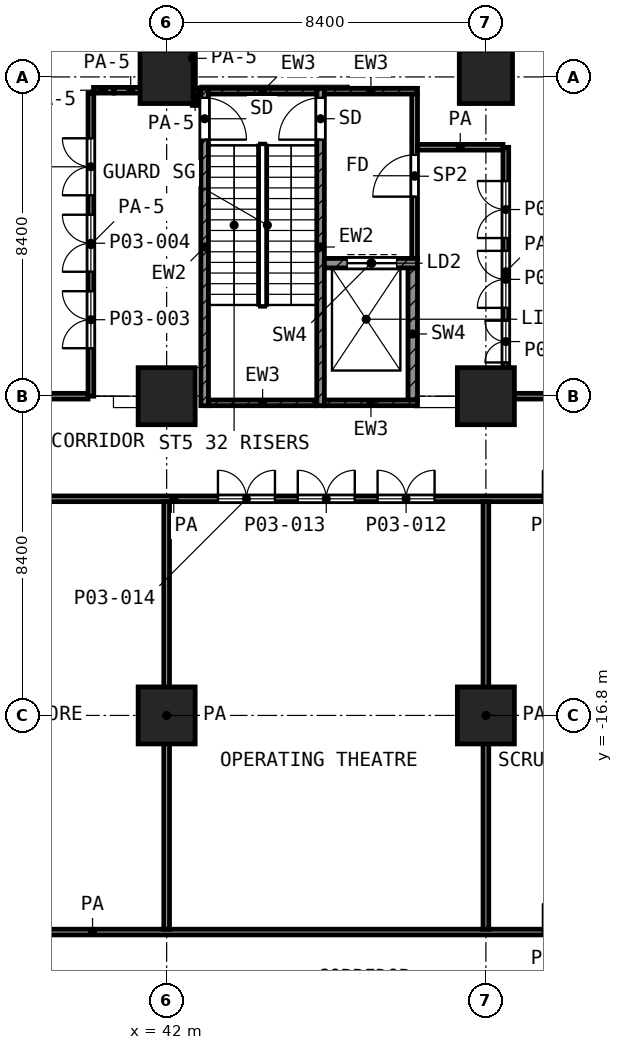
"""IFC4 building model, lengths in metres.
Left out: names, types, materials, properties, quantities, classifications, styles, units other than length and angle.
Written with IfcOpenShell. Run it as: python <this file> out.ifc"""

import sys

from ifc_helpers import new_model, si_unit, direction, frame, frame_2d, origin, origin_2d, place, context, subcontext, project, spatial, rectangle, extrude, element, fill, save


model = new_model("IFC4")
c1 = context("Model", 3, precision=1e-05, world=origin(), true_north=direction((0.0, 1.0)))
c2 = subcontext(c1, "Body", "Model", "MODEL_VIEW")
j1 = project(units=[si_unit("LENGTHUNIT", "METRE"), si_unit("PLANEANGLEUNIT", "RADIAN")], contexts=[c1])
p1 = place(None, origin())
s1 = spatial("IfcSite", under=j1, at=p1, CompositionType="ELEMENT")
p2 = place(p1, origin())
s2 = spatial("IfcBuilding", under=s1, at=p2, CompositionType="ELEMENT")
p3 = place(p2, frame((0.0, 0.0, 12.6)))
s3 = spatial("IfcBuildingStorey", under=s2, at=p3, CompositionType="ELEMENT", Elevation=12.6)
for number, where, z_axis, x_axis in (
    (1, (42.0, 0.0, 0.0), (0.0, 0.0, 1.0), (1.0, 0.0, 0.0)),
    (2, (50.4, 0.0, 0.0), (0.0, 0.0, 1.0), (1.0, 0.0, 0.0)),
):
    element("IfcColumn", number, at=place(p3, frame(where, z_axis=z_axis, x_axis=x_axis)), inside=s3, PredefinedType="COLUMN", context=c2, shape_type="SweptSolid", body=[
        extrude(rectangle(XDim=1.4, YDim=1.4, at=origin_2d()), origin(), (0.0, 0.0, 1.0), 5.6),
    ])
for number, where, z_axis, x_axis in (
    (3, (42.0, -8.4, 0.0), (0.0, 0.0, 1.0), (1.0, 0.0, 0.0)),
    (4, (50.4, -8.4, 0.0), (0.0, 0.0, 1.0), (1.0, 0.0, 0.0)),
    (5, (42.0, -16.8, 0.0), (0.0, 0.0, 1.0), (1.0, 0.0, 0.0)),
    (6, (50.4, -16.8, 0.0), (0.0, 0.0, 1.0), (1.0, 0.0, 0.0)),
):
    element("IfcColumn", number, at=place(p3, frame(where, z_axis=z_axis, x_axis=x_axis)), inside=s3, PredefinedType="COLUMN", context=c2, shape_type="SweptSolid", body=[
        extrude(rectangle(XDim=1.5, YDim=1.5, at=origin_2d()), origin(), (0.0, 0.0, 1.0), 5.6),
    ])
p4 = place(p3, frame((43.0, -8.65, 0.0), z_axis=(0.0, 0.0, 1.0), x_axis=(0.0, 1.0, 0.0)))
e7 = element("IfcWall", 7, at=p4, inside=s3, PredefinedType="SHEAR", context=c2, shape_type="SweptSolid", body=[
    extrude(rectangle(XDim=8.35, YDim=0.2, at=frame_2d((4.175, 0.0))), origin(), (0.0, 0.0, 1.0), 5.25),
])
p5 = place(p4, frame((7.0, 0.0, 0.0)))
e8 = element("IfcOpeningElement", 8, at=p5, cuts=e7, PredefinedType="OPENING", context=c2, shape_type="SweptSolid", body=[
    extrude(rectangle(XDim=1.1, YDim=2.1, at=frame_2d((0.55, 1.05))), frame((0.0, 0.11, 0.0), z_axis=(0.0, -1.0, 0.0), x_axis=(1.0, 0.0, 0.0)), (0.0, 0.0, 1.0), 0.22),
])
p6 = place(p3, frame((46.05, -8.65, 0.0), z_axis=(0.0, 0.0, 1.0), x_axis=(0.0, 1.0, 0.0)))
e9 = element("IfcWall", 9, at=p6, inside=s3, PredefinedType="SHEAR", context=c2, shape_type="SweptSolid", body=[
    extrude(rectangle(XDim=8.35, YDim=0.2, at=frame_2d((4.175, 0.0))), origin(), (0.0, 0.0, 1.0), 5.25),
])
p7 = place(p6, frame((7.0, 0.0, 0.0)))
e10 = element("IfcOpeningElement", 10, at=p7, cuts=e9, PredefinedType="OPENING", context=c2, shape_type="SweptSolid", body=[
    extrude(rectangle(XDim=1.1, YDim=2.1, at=frame_2d((0.55, 1.05))), frame((0.0, 0.11, 0.0), z_axis=(0.0, -1.0, 0.0), x_axis=(1.0, 0.0, 0.0)), (0.0, 0.0, 1.0), 0.22),
])
p8 = place(p3, frame((43.1, -0.375, 0.0), z_axis=(0.0, 0.0, 1.0), x_axis=(1.0, 0.0, 0.0)))
e11 = element("IfcWall", 11, at=p8, inside=s3, PredefinedType="SHEAR", context=c2, shape_type="SweptSolid", body=[
    extrude(rectangle(XDim=2.85, YDim=0.15, at=frame_2d((1.425, 0.0))), origin(), (0.0, 0.0, 1.0), 5.25),
])
p9 = place(p3, frame((46.15, -0.375, 0.0), z_axis=(0.0, 0.0, 1.0), x_axis=(1.0, 0.0, 0.0)))
e12 = element("IfcWall", 12, at=p9, inside=s3, PredefinedType="SHEAR", context=c2, shape_type="SweptSolid", body=[
    extrude(rectangle(XDim=2.45, YDim=0.15, at=frame_2d((1.225, 0.0))), origin(), (0.0, 0.0, 1.0), 5.25),
])
p10 = place(p3, frame((43.1, -8.575, 0.0), z_axis=(0.0, 0.0, 1.0), x_axis=(1.0, 0.0, 0.0)))
e13 = element("IfcWall", 13, at=p10, inside=s3, PredefinedType="SHEAR", context=c2, shape_type="SweptSolid", body=[
    extrude(rectangle(XDim=2.85, YDim=0.15, at=frame_2d((1.425, 0.0))), origin(), (0.0, 0.0, 1.0), 5.25),
])
p11 = place(p3, frame((46.15, -8.575, 0.0), z_axis=(0.0, 0.0, 1.0), x_axis=(1.0, 0.0, 0.0)))
e14 = element("IfcWall", 14, at=p11, inside=s3, PredefinedType="SHEAR", context=c2, shape_type="SweptSolid", body=[
    extrude(rectangle(XDim=2.45, YDim=0.15, at=frame_2d((1.225, 0.0))), origin(), (0.0, 0.0, 1.0), 5.25),
])
p12 = place(p3, frame((46.15, -4.9, 0.0), z_axis=(0.0, 0.0, 1.0), x_axis=(1.0, 0.0, 0.0)))
e15 = element("IfcWall", 15, at=p12, inside=s3, PredefinedType="SHEAR", context=c2, shape_type="SweptSolid", body=[
    extrude(rectangle(XDim=2.45, YDim=0.25, at=frame_2d((1.225, 0.0))), origin(), (0.0, 0.0, 1.0), 5.25),
])
p13 = place(p12, frame((0.6, 0.0, 0.0)))
e16 = element("IfcOpeningElement", 16, at=p13, cuts=e15, PredefinedType="OPENING", context=c2, shape_type="SweptSolid", body=[
    extrude(rectangle(XDim=1.3, YDim=2.1, at=frame_2d((0.65, 1.05))), frame((0.0, 0.135, 0.0), z_axis=(0.0, -1.0, 0.0), x_axis=(1.0, 0.0, 0.0)), (0.0, 0.0, 1.0), 0.27),
])
p14 = place(p3, frame((48.475, -8.5, 0.0), z_axis=(0.0, 0.0, 1.0), x_axis=(0.0, 1.0, 0.0)))
e17 = element("IfcWall", 17, at=p14, inside=s3, PredefinedType="SHEAR", context=c2, shape_type="SweptSolid", body=[
    extrude(rectangle(XDim=3.475, YDim=0.25, at=frame_2d((1.738, 0.0))), origin(), (0.0, 0.0, 1.0), 5.25),
])
p15 = place(p3, frame((48.525, -4.775, 0.0), z_axis=(0.0, 0.0, 1.0), x_axis=(0.0, 1.0, 0.0)))
e18 = element("IfcWall", 18, at=p15, inside=s3, PredefinedType="PARTITIONING", context=c2, shape_type="SweptSolid", body=[
    extrude(rectangle(XDim=4.325, YDim=0.15, at=frame_2d((2.163, 0.0))), origin(), (0.0, 0.0, 1.0), 5.25),
])
p16 = place(p15, frame((1.625, 0.0, 0.0)))
e19 = element("IfcOpeningElement", 19, at=p16, cuts=e18, PredefinedType="OPENING", context=c2, shape_type="SweptSolid", body=[
    extrude(rectangle(XDim=1.1, YDim=2.1, at=frame_2d((0.55, 1.05))), frame((0.0, 0.085, 0.0), z_axis=(0.0, -1.0, 0.0), x_axis=(1.0, 0.0, 0.0)), (0.0, 0.0, 1.0), 0.17),
])
p17 = place(p3, frame((25.2, -22.5, 0.0), z_axis=(0.0, 0.0, 1.0), x_axis=(1.0, 0.0, 0.0)))
e20 = element("IfcWall", 20, at=p17, inside=s3, PredefinedType="PARTITIONING", context=c2, shape_type="SweptSolid", body=[
    extrude(rectangle(XDim=29.7, YDim=0.15, at=frame_2d((14.85, 0.0))), origin(), (0.0, 0.0, 1.0), 5.25),
])
p18 = place(p17, frame((12.1, 0.0, 0.0)))
e21 = element("IfcOpeningElement", 21, at=p18, cuts=e20, PredefinedType="OPENING", context=c2, shape_type="SweptSolid", body=[
    extrude(rectangle(XDim=1.0, YDim=2.1, at=frame_2d((0.5, 1.05))), frame((0.0, 0.085, 0.0), z_axis=(0.0, -1.0, 0.0), x_axis=(1.0, 0.0, 0.0)), (0.0, 0.0, 1.0), 0.17),
])
p19 = place(p17, frame((26.7, 0.0, 0.0)))
e22 = element("IfcOpeningElement", 22, at=p19, cuts=e20, PredefinedType="OPENING", context=c2, shape_type="SweptSolid", body=[
    extrude(rectangle(XDim=1.5, YDim=2.1, at=frame_2d((0.75, 1.05))), frame((0.0, 0.085, 0.0), z_axis=(0.0, -1.0, 0.0), x_axis=(1.0, 0.0, 0.0)), (0.0, 0.0, 1.0), 0.17),
])
p20 = place(p3, frame((29.475, -11.1, 0.0), z_axis=(0.0, 0.0, 1.0), x_axis=(1.0, 0.0, 0.0)))
e23 = element("IfcWall", 23, at=p20, inside=s3, PredefinedType="PARTITIONING", context=c2, shape_type="SweptSolid", body=[
    extrude(rectangle(XDim=25.425, YDim=0.15, at=frame_2d((12.712, 0.0))), origin(), (0.0, 0.0, 1.0), 5.25),
])
p21 = place(p20, frame((18.075, 0.0, 0.0)))
e24 = element("IfcOpeningElement", 24, at=p21, cuts=e23, PredefinedType="OPENING", context=c2, shape_type="SweptSolid", body=[
    extrude(rectangle(XDim=1.5, YDim=2.1, at=frame_2d((0.75, 1.05))), frame((0.0, 0.085, 0.0), z_axis=(0.0, -1.0, 0.0), x_axis=(1.0, 0.0, 0.0)), (0.0, 0.0, 1.0), 0.17),
])
p22 = place(p20, frame((15.975, 0.0, 0.0)))
e25 = element("IfcOpeningElement", 25, at=p22, cuts=e23, PredefinedType="OPENING", context=c2, shape_type="SweptSolid", body=[
    extrude(rectangle(XDim=1.5, YDim=2.1, at=frame_2d((0.75, 1.05))), frame((0.0, 0.085, 0.0), z_axis=(0.0, -1.0, 0.0), x_axis=(1.0, 0.0, 0.0)), (0.0, 0.0, 1.0), 0.17),
])
p23 = place(p20, frame((13.875, 0.0, 0.0)))
e26 = element("IfcOpeningElement", 26, at=p23, cuts=e23, PredefinedType="OPENING", context=c2, shape_type="SweptSolid", body=[
    extrude(rectangle(XDim=1.5, YDim=2.1, at=frame_2d((0.75, 1.05))), frame((0.0, 0.085, 0.0), z_axis=(0.0, -1.0, 0.0), x_axis=(1.0, 0.0, 0.0)), (0.0, 0.0, 1.0), 0.17),
])
p24 = place(p20, frame((22.425, 0.0, 0.0)))
e27 = element("IfcOpeningElement", 27, at=p24, cuts=e23, PredefinedType="OPENING", context=c2, shape_type="SweptSolid", body=[
    extrude(rectangle(XDim=1.5, YDim=2.1, at=frame_2d((0.75, 1.05))), frame((0.0, 0.085, 0.0), z_axis=(0.0, -1.0, 0.0), x_axis=(1.0, 0.0, 0.0)), (0.0, 0.0, 1.0), 0.17),
])
p25 = place(p20, frame((1.525, 0.0, 0.0)))
e28 = element("IfcOpeningElement", 28, at=p25, cuts=e23, PredefinedType="OPENING", context=c2, shape_type="SweptSolid", body=[
    extrude(rectangle(XDim=1.0, YDim=2.1, at=frame_2d((0.5, 1.05))), frame((0.0, 0.085, 0.0), z_axis=(0.0, -1.0, 0.0), x_axis=(1.0, 0.0, 0.0)), (0.0, 0.0, 1.0), 0.17),
])
p26 = place(p3, frame((25.2, -8.4, 0.0), z_axis=(0.0, 0.0, 1.0), x_axis=(1.0, 0.0, 0.0)))
e29 = element("IfcWall", 29, at=p26, inside=s3, PredefinedType="PARTITIONING", context=c2, shape_type="SweptSolid", body=[
    extrude(rectangle(XDim=14.732, YDim=0.15, at=frame_2d((7.366, 0.0))), origin(), (0.0, 0.0, 1.0), 5.25),
])
p27 = place(p26, frame((1.2, 0.0, 0.0)))
e30 = element("IfcOpeningElement", 30, at=p27, cuts=e29, PredefinedType="OPENING", context=c2, shape_type="SweptSolid", body=[
    extrude(rectangle(XDim=1.2, YDim=2.1, at=frame_2d((0.6, 1.05))), frame((0.0, 0.085, 0.0), z_axis=(0.0, -1.0, 0.0), x_axis=(1.0, 0.0, 0.0)), (0.0, 0.0, 1.0), 0.17),
])
p28 = place(p26, frame((6.6, 0.0, 0.0)))
e31 = element("IfcOpeningElement", 31, at=p28, cuts=e29, PredefinedType="OPENING", context=c2, shape_type="SweptSolid", body=[
    extrude(rectangle(XDim=1.0, YDim=2.1, at=frame_2d((0.5, 1.05))), frame((0.0, 0.085, 0.0), z_axis=(0.0, -1.0, 0.0), x_axis=(1.0, 0.0, 0.0)), (0.0, 0.0, 1.0), 0.17),
])
p29 = place(p3, frame((51.0, -8.4, 0.0), z_axis=(0.0, 0.0, 1.0), x_axis=(1.0, 0.0, 0.0)))
e32 = element("IfcWall", 32, at=p29, inside=s3, PredefinedType="PARTITIONING", context=c2, shape_type="SweptSolid", body=[
    extrude(rectangle(XDim=6.6, YDim=0.15, at=frame_2d((3.3, 0.0))), origin(), (0.0, 0.0, 1.0), 5.25),
])
p30 = place(p29, frame((3.5, 0.0, 0.0)))
e33 = element("IfcOpeningElement", 33, at=p30, cuts=e32, PredefinedType="OPENING", context=c2, shape_type="SweptSolid", body=[
    extrude(rectangle(XDim=1.5, YDim=2.1, at=frame_2d((0.75, 1.05))), frame((0.0, 0.085, 0.0), z_axis=(0.0, -1.0, 0.0), x_axis=(1.0, 0.0, 0.0)), (0.0, 0.0, 1.0), 0.17),
])
p31 = place(p29, frame((5.3, 0.0, 0.0)))
e34 = element("IfcOpeningElement", 34, at=p31, cuts=e32, PredefinedType="OPENING", context=c2, shape_type="SweptSolid", body=[
    extrude(rectangle(XDim=1.1, YDim=2.1, at=frame_2d((0.55, 1.05))), frame((0.0, 0.085, 0.0), z_axis=(0.0, -1.0, 0.0), x_axis=(1.0, 0.0, 0.0)), (0.0, 0.0, 1.0), 0.17),
])
p32 = place(p3, frame((48.6, -1.85, 0.0), z_axis=(0.0, 0.0, 1.0), x_axis=(1.0, 0.0, 0.0)))
e35 = element("IfcWall", 35, at=p32, inside=s3, PredefinedType="PARTITIONING", context=c2, shape_type="SweptSolid", body=[
    extrude(rectangle(XDim=2.249, YDim=0.15, at=frame_2d((1.125, 0.0))), origin(), (0.0, 0.0, 1.0), 5.25),
])
p33 = place(p3, frame((40.076, -0.35, 0.0), z_axis=(0.0, 0.0, 1.0), x_axis=(1.0, 0.0, 0.0)))
e36 = element("IfcWall", 36, at=p33, inside=s3, PredefinedType="PARTITIONING", context=c2, shape_type="SweptSolid", body=[
    extrude(rectangle(XDim=0.524, YDim=0.15, at=frame_2d((0.262, 0.0))), origin(), (0.0, 0.0, 1.0), 3.85),
])
p34 = place(p3, frame((40.62, -0.35, 0.0), z_axis=(0.0, 0.0, 1.0), x_axis=(1.0, 0.0, 0.0)))
e37 = element("IfcWall", 37, at=p34, inside=s3, PredefinedType="PARTITIONING", context=c2, shape_type="SweptSolid", body=[
    extrude(rectangle(XDim=0.868, YDim=0.15, at=frame_2d((0.434, 0.0))), origin(), (0.0, 0.0, 1.0), 3.85),
])
p35 = place(p3, frame((40.007, -8.4, 0.0), z_axis=(0.0, 0.0, 1.0), x_axis=(0.0, 1.0, 0.0)))
e38 = element("IfcWall", 38, at=p35, inside=s3, PredefinedType="PARTITIONING", context=c2, shape_type="SweptSolid", body=[
    extrude(rectangle(XDim=7.975, YDim=0.15, at=frame_2d((3.987, 0.0))), origin(), (0.0, 0.0, 1.0), 3.85),
])
p36 = place(p35, frame((1.262, 0.0, 0.0)))
e39 = element("IfcOpeningElement", 39, at=p36, cuts=e38, PredefinedType="OPENING", context=c2, shape_type="SweptSolid", body=[
    extrude(rectangle(XDim=1.5, YDim=2.1, at=frame_2d((0.75, 1.05))), frame((0.0, 0.085, 0.0), z_axis=(0.0, -1.0, 0.0), x_axis=(1.0, 0.0, 0.0)), (0.0, 0.0, 1.0), 0.17),
])
p37 = place(p35, frame((3.274, 0.0, 0.0)))
e40 = element("IfcOpeningElement", 40, at=p37, cuts=e38, PredefinedType="OPENING", context=c2, shape_type="SweptSolid", body=[
    extrude(rectangle(XDim=1.5, YDim=2.1, at=frame_2d((0.75, 1.05))), frame((0.0, 0.085, 0.0), z_axis=(0.0, -1.0, 0.0), x_axis=(1.0, 0.0, 0.0)), (0.0, 0.0, 1.0), 0.17),
])
p38 = place(p35, frame((5.286, 0.0, 0.0)))
e41 = element("IfcOpeningElement", 41, at=p38, cuts=e38, PredefinedType="OPENING", context=c2, shape_type="SweptSolid", body=[
    extrude(rectangle(XDim=1.5, YDim=2.1, at=frame_2d((0.75, 1.05))), frame((0.0, 0.085, 0.0), z_axis=(0.0, -1.0, 0.0), x_axis=(1.0, 0.0, 0.0)), (0.0, 0.0, 1.0), 0.17),
])
p39 = place(p3, frame((42.0, -22.425, 0.0), z_axis=(0.0, 0.0, 1.0), x_axis=(0.0, 1.0, 0.0)))
e42 = element("IfcWall", 42, at=p39, inside=s3, PredefinedType="PARTITIONING", context=c2, shape_type="SweptSolid", body=[
    extrude(rectangle(XDim=11.25, YDim=0.15, at=frame_2d((5.625, 0.0))), origin(), (0.0, 0.0, 1.0), 5.25),
])
p40 = place(p3, frame((42.68, -0.3, 0.0), z_axis=(0.0, 0.0, 1.0), x_axis=(0.0, 1.0, 0.0)))
e43 = element("IfcWall", 43, at=p40, inside=s3, PredefinedType="PARTITIONING", context=c2, shape_type="SweptSolid", body=[
    extrude(rectangle(XDim=1.58, YDim=0.15, at=frame_2d((0.79, 0.0))), origin(), (0.0, 0.0, 1.0), 3.85),
])
p41 = place(p3, frame((42.75, -0.75, 0.0), z_axis=(0.0, 0.0, 1.0), x_axis=(0.0, 1.0, 0.0)))
e44 = element("IfcWall", 44, at=p41, inside=s3, PredefinedType="PARTITIONING", context=c2, shape_type="SweptSolid", body=[
    extrude(rectangle(XDim=0.45, YDim=0.15, at=frame_2d((0.225, 0.0))), origin(), (0.0, 0.0, 1.0), 3.85),
])
p42 = place(p3, frame((50.4, -22.425, 0.0), z_axis=(0.0, 0.0, 1.0), x_axis=(0.0, 1.0, 0.0)))
e45 = element("IfcWall", 45, at=p42, inside=s3, PredefinedType="PARTITIONING", context=c2, shape_type="SweptSolid", body=[
    extrude(rectangle(XDim=11.25, YDim=0.15, at=frame_2d((5.625, 0.0))), origin(), (0.0, 0.0, 1.0), 5.25),
])
p43 = place(p3, frame((50.925, -8.4, 0.0), z_axis=(0.0, 0.0, 1.0), x_axis=(0.0, 1.0, 0.0)))
e46 = element("IfcWall", 46, at=p43, inside=s3, PredefinedType="PARTITIONING", context=c2, shape_type="SweptSolid", body=[
    extrude(rectangle(XDim=6.548, YDim=0.15, at=frame_2d((3.274, 0.0))), origin(), (0.0, 0.0, 1.0), 5.25),
])
p44 = place(p43, frame((4.161, 0.0, 0.0)))
e47 = element("IfcOpeningElement", 47, at=p44, cuts=e46, PredefinedType="OPENING", context=c2, shape_type="SweptSolid", body=[
    extrude(rectangle(XDim=1.5, YDim=2.1, at=frame_2d((0.75, 1.05))), frame((0.0, 0.085, 0.0), z_axis=(0.0, -1.0, 0.0), x_axis=(1.0, 0.0, 0.0)), (0.0, 0.0, 1.0), 0.17),
])
p45 = place(p43, frame((2.324, 0.0, 0.0)))
e48 = element("IfcOpeningElement", 48, at=p45, cuts=e46, PredefinedType="OPENING", context=c2, shape_type="SweptSolid", body=[
    extrude(rectangle(XDim=1.5, YDim=2.1, at=frame_2d((0.75, 1.05))), frame((0.0, 0.085, 0.0), z_axis=(0.0, -1.0, 0.0), x_axis=(1.0, 0.0, 0.0)), (0.0, 0.0, 1.0), 0.17),
])
p46 = place(p43, frame((0.887, 0.0, 0.0)))
e49 = element("IfcOpeningElement", 49, at=p46, cuts=e46, PredefinedType="OPENING", context=c2, shape_type="SweptSolid", body=[
    extrude(rectangle(XDim=1.1, YDim=2.1, at=frame_2d((0.55, 1.05))), frame((0.0, 0.085, 0.0), z_axis=(0.0, -1.0, 0.0), x_axis=(1.0, 0.0, 0.0)), (0.0, 0.0, 1.0), 0.17),
])
p47 = place(p5, frame((1.1, 0.0, 0.0), z_axis=(0.0, 0.0, 1.0), x_axis=(-1.0, 0.0, 0.0)))
e50 = element("IfcDoor", 50, at=p47, inside=s3, OperationType="SINGLE_SWING_LEFT", PredefinedType="DOOR", context=c2, shape_type="SweptSolid", body=[
    extrude(rectangle(XDim=1.1, YDim=2.1, at=frame_2d((0.55, 1.05))), frame((0.0, 0.025, 0.0), z_axis=(0.0, -1.0, 0.0), x_axis=(1.0, 0.0, 0.0)), (0.0, 0.0, 1.0), 0.05),
])
fill(e8, e50)
p48 = place(p7, origin())
e51 = element("IfcDoor", 51, at=p48, inside=s3, OperationType="SINGLE_SWING_LEFT", PredefinedType="DOOR", context=c2, shape_type="SweptSolid", body=[
    extrude(rectangle(XDim=1.1, YDim=2.1, at=frame_2d((0.55, 1.05))), frame((0.0, 0.025, 0.0), z_axis=(0.0, -1.0, 0.0), x_axis=(1.0, 0.0, 0.0)), (0.0, 0.0, 1.0), 0.05),
])
fill(e10, e51)
p49 = place(p13, origin())
e52 = element("IfcDoor", 52, at=p49, inside=s3, OperationType="DOUBLE_DOOR_SLIDING", PredefinedType="DOOR", context=c2, shape_type="SweptSolid", body=[
    extrude(rectangle(XDim=1.3, YDim=2.1, at=frame_2d((0.65, 1.05))), frame((0.0, 0.025, 0.0), z_axis=(0.0, -1.0, 0.0), x_axis=(1.0, 0.0, 0.0)), (0.0, 0.0, 1.0), 0.05),
])
fill(e16, e52)
p50 = place(p16, origin())
e53 = element("IfcDoor", 53, at=p50, inside=s3, OperationType="SINGLE_SWING_LEFT", PredefinedType="DOOR", context=c2, shape_type="SweptSolid", body=[
    extrude(rectangle(XDim=1.1, YDim=2.1, at=frame_2d((0.55, 1.05))), frame((0.0, 0.025, 0.0), z_axis=(0.0, -1.0, 0.0), x_axis=(1.0, 0.0, 0.0)), (0.0, 0.0, 1.0), 0.05),
])
fill(e19, e53)
p51 = place(p36, origin())
e54 = element("IfcDoor", 54, at=p51, inside=s3, OperationType="DOUBLE_DOOR_SINGLE_SWING", PredefinedType="DOOR", context=c2, shape_type="SweptSolid", body=[
    extrude(rectangle(XDim=1.5, YDim=2.1, at=frame_2d((0.75, 1.05))), frame((0.0, 0.025, 0.0), z_axis=(0.0, -1.0, 0.0), x_axis=(1.0, 0.0, 0.0)), (0.0, 0.0, 1.0), 0.05),
])
fill(e39, e54)
p52 = place(p37, origin())
e55 = element("IfcDoor", 55, at=p52, inside=s3, OperationType="DOUBLE_DOOR_SINGLE_SWING", PredefinedType="DOOR", context=c2, shape_type="SweptSolid", body=[
    extrude(rectangle(XDim=1.5, YDim=2.1, at=frame_2d((0.75, 1.05))), frame((0.0, 0.025, 0.0), z_axis=(0.0, -1.0, 0.0), x_axis=(1.0, 0.0, 0.0)), (0.0, 0.0, 1.0), 0.05),
])
fill(e40, e55)
p53 = place(p38, origin())
e56 = element("IfcDoor", 56, at=p53, inside=s3, OperationType="DOUBLE_DOOR_SINGLE_SWING", PredefinedType="DOOR", context=c2, shape_type="SweptSolid", body=[
    extrude(rectangle(XDim=1.5, YDim=2.1, at=frame_2d((0.75, 1.05))), frame((0.0, 0.025, 0.0), z_axis=(0.0, -1.0, 0.0), x_axis=(1.0, 0.0, 0.0)), (0.0, 0.0, 1.0), 0.05),
])
fill(e41, e56)
p54 = place(p44, origin())
e57 = element("IfcDoor", 57, at=p54, inside=s3, OperationType="DOUBLE_DOOR_SINGLE_SWING", PredefinedType="DOOR", context=c2, shape_type="SweptSolid", body=[
    extrude(rectangle(XDim=1.5, YDim=2.1, at=frame_2d((0.75, 1.05))), frame((0.0, 0.025, 0.0), z_axis=(0.0, -1.0, 0.0), x_axis=(1.0, 0.0, 0.0)), (0.0, 0.0, 1.0), 0.05),
])
fill(e47, e57)
p55 = place(p45, origin())
e58 = element("IfcDoor", 58, at=p55, inside=s3, OperationType="DOUBLE_DOOR_SINGLE_SWING", PredefinedType="DOOR", context=c2, shape_type="SweptSolid", body=[
    extrude(rectangle(XDim=1.5, YDim=2.1, at=frame_2d((0.75, 1.05))), frame((0.0, 0.025, 0.0), z_axis=(0.0, -1.0, 0.0), x_axis=(1.0, 0.0, 0.0)), (0.0, 0.0, 1.0), 0.05),
])
fill(e48, e58)
p56 = place(p46, origin())
e59 = element("IfcDoor", 59, at=p56, inside=s3, OperationType="DOUBLE_DOOR_SINGLE_SWING", PredefinedType="DOOR", context=c2, shape_type="SweptSolid", body=[
    extrude(rectangle(XDim=1.1, YDim=2.1, at=frame_2d((0.55, 1.05))), frame((0.0, 0.025, 0.0), z_axis=(0.0, -1.0, 0.0), x_axis=(1.0, 0.0, 0.0)), (0.0, 0.0, 1.0), 0.05),
])
fill(e49, e59)
p57 = place(p21, origin())
e60 = element("IfcDoor", 60, at=p57, inside=s3, OperationType="DOUBLE_DOOR_SINGLE_SWING", PredefinedType="DOOR", context=c2, shape_type="SweptSolid", body=[
    extrude(rectangle(XDim=1.5, YDim=2.1, at=frame_2d((0.75, 1.05))), frame((0.0, 0.025, 0.0), z_axis=(0.0, -1.0, 0.0), x_axis=(1.0, 0.0, 0.0)), (0.0, 0.0, 1.0), 0.05),
])
fill(e24, e60)
p58 = place(p22, origin())
e61 = element("IfcDoor", 61, at=p58, inside=s3, OperationType="DOUBLE_DOOR_SINGLE_SWING", PredefinedType="DOOR", context=c2, shape_type="SweptSolid", body=[
    extrude(rectangle(XDim=1.5, YDim=2.1, at=frame_2d((0.75, 1.05))), frame((0.0, 0.025, 0.0), z_axis=(0.0, -1.0, 0.0), x_axis=(1.0, 0.0, 0.0)), (0.0, 0.0, 1.0), 0.05),
])
fill(e25, e61)
p59 = place(p23, origin())
e62 = element("IfcDoor", 62, at=p59, inside=s3, OperationType="DOUBLE_DOOR_SINGLE_SWING", PredefinedType="DOOR", context=c2, shape_type="SweptSolid", body=[
    extrude(rectangle(XDim=1.5, YDim=2.1, at=frame_2d((0.75, 1.05))), frame((0.0, 0.025, 0.0), z_axis=(0.0, -1.0, 0.0), x_axis=(1.0, 0.0, 0.0)), (0.0, 0.0, 1.0), 0.05),
])
fill(e26, e62)
p60 = place(p24, origin())
e63 = element("IfcDoor", 63, at=p60, inside=s3, OperationType="DOUBLE_DOOR_SINGLE_SWING", PredefinedType="DOOR", context=c2, shape_type="SweptSolid", body=[
    extrude(rectangle(XDim=1.5, YDim=2.1, at=frame_2d((0.75, 1.05))), frame((0.0, 0.025, 0.0), z_axis=(0.0, -1.0, 0.0), x_axis=(1.0, 0.0, 0.0)), (0.0, 0.0, 1.0), 0.05),
])
fill(e27, e63)
p61 = place(p19, origin())
e64 = element("IfcDoor", 64, at=p61, inside=s3, OperationType="DOUBLE_DOOR_SINGLE_SWING", PredefinedType="DOOR", context=c2, shape_type="SweptSolid", body=[
    extrude(rectangle(XDim=1.5, YDim=2.1, at=frame_2d((0.75, 1.05))), frame((0.0, 0.025, 0.0), z_axis=(0.0, -1.0, 0.0), x_axis=(1.0, 0.0, 0.0)), (0.0, 0.0, 1.0), 0.05),
])
fill(e22, e64)
save(model, sys.argv[1])
